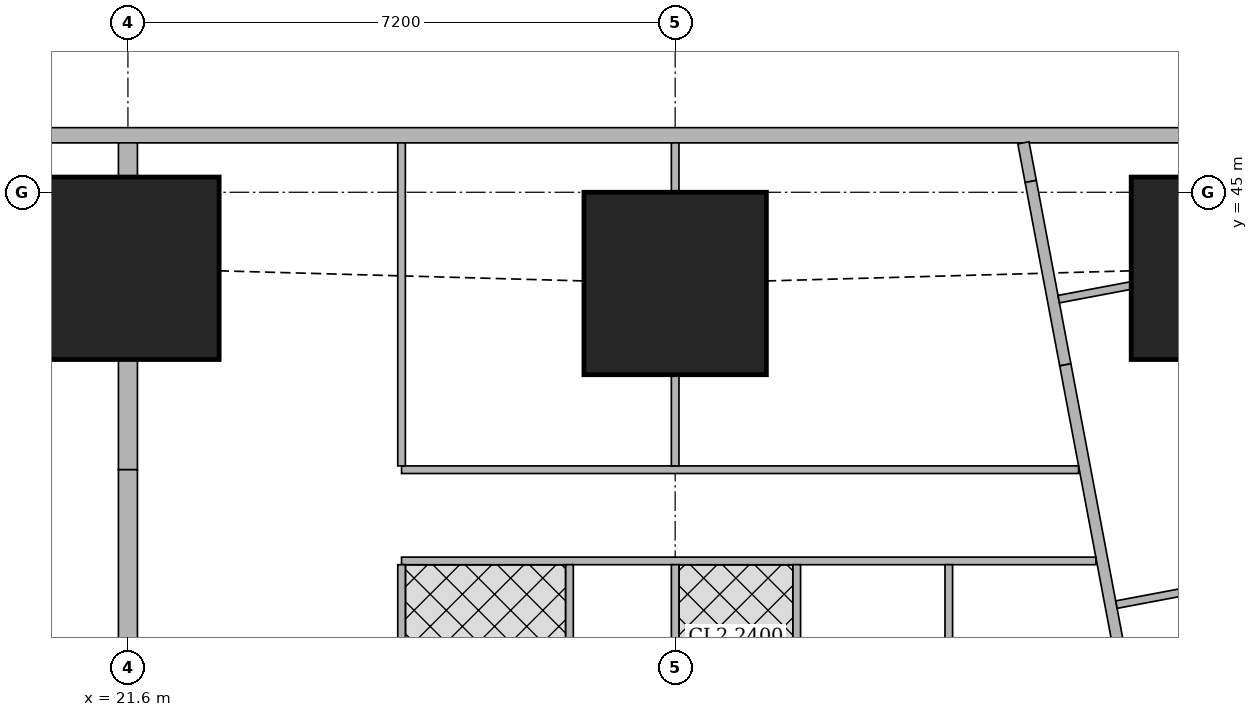
"""IFC4 building model, lengths in metres.
Left out: names, types, materials, properties, quantities, classifications, styles, units other than length and angle.
Written with IfcOpenShell. Run it as: python <this file> out.ifc"""

import sys

from ifc_helpers import new_model, si_unit, direction, frame, frame_2d, origin, origin_2d, place, context, subcontext, project, spatial, rectangle, extrude, element, fill, save


model = new_model("IFC4")
c1 = context("Model", 3, precision=1e-05, world=origin(), true_north=direction((0.0, 1.0)))
c2 = subcontext(c1, "Body", "Model", "MODEL_VIEW")
j1 = project(units=[si_unit("LENGTHUNIT", "METRE"), si_unit("PLANEANGLEUNIT", "RADIAN")], contexts=[c1])
p1 = place(None, origin())
s1 = spatial("IfcSite", under=j1, at=p1, CompositionType="ELEMENT")
p2 = place(p1, origin())
s2 = spatial("IfcBuilding", under=s1, at=p2, CompositionType="ELEMENT")
p3 = place(p2, frame((0.0, 0.0, 234.95)))
s3 = spatial("IfcBuildingStorey", under=s2, at=p3, CompositionType="ELEMENT", Elevation=234.95)
for number, where, z_axis, x_axis in (
    (1, (21.6, 44.0, 0.0), (0.0, 0.0, 1.0), (1.0, 0.0, 0.0)),
    (2, (28.8, 43.8, 0.0), (0.0, 0.0, 1.0), (1.0, 0.0, 0.0)),
    (3, (36.0, 44.0, 0.0), (0.0, 0.0, 1.0), (1.0, 0.0, 0.0)),
):
    element("IfcColumn", number, at=place(p3, frame(where, z_axis=z_axis, x_axis=x_axis)), inside=s3, PredefinedType="COLUMN", context=c2, shape_type="SweptSolid", body=[
        extrude(rectangle(XDim=2.4, YDim=2.4, at=origin_2d()), origin(), (0.0, 0.0, 1.0), 3.75),
    ])
p4 = place(p3, frame((40.106, 45.75, 0.0), z_axis=(0.0, 0.0, 1.0), x_axis=(-1.0, 0.0, 0.0)))
e4 = element("IfcWall", 4, at=p4, inside=s3, PredefinedType="SOLIDWALL", context=c2, shape_type="SweptSolid", body=[
    extrude(rectangle(XDim=25.543, YDim=0.2, at=frame_2d((12.771, 0.0))), origin(), (0.0, 0.0, 1.0), 3.5),
])
p5 = place(p4, frame((8.606, 0.0, 0.9)))
e5 = element("IfcOpeningElement", 5, at=p5, cuts=e4, PredefinedType="OPENING", context=c2, shape_type="SweptSolid", body=[
    extrude(rectangle(XDim=1.8, YDim=1.5, at=frame_2d((0.9, 0.75))), frame((0.0, 0.11, 0.0), z_axis=(0.0, -1.0, 0.0), x_axis=(1.0, 0.0, 0.0)), (0.0, 0.0, 1.0), 0.22),
])
p6 = place(p4, frame((12.206, 0.0, 0.9)))
e6 = element("IfcOpeningElement", 6, at=p6, cuts=e4, PredefinedType="OPENING", context=c2, shape_type="SweptSolid", body=[
    extrude(rectangle(XDim=1.8, YDim=1.5, at=frame_2d((0.9, 0.75))), frame((0.0, 0.11, 0.0), z_axis=(0.0, -1.0, 0.0), x_axis=(1.0, 0.0, 0.0)), (0.0, 0.0, 1.0), 0.22),
])
p7 = place(p4, frame((15.806, 0.0, 0.9)))
e7 = element("IfcOpeningElement", 7, at=p7, cuts=e4, PredefinedType="OPENING", context=c2, shape_type="SweptSolid", body=[
    extrude(rectangle(XDim=1.8, YDim=1.5, at=frame_2d((0.9, 0.75))), frame((0.0, 0.11, 0.0), z_axis=(0.0, -1.0, 0.0), x_axis=(1.0, 0.0, 0.0)), (0.0, 0.0, 1.0), 0.22),
])
p8 = place(p4, frame((20.825, 0.0, 0.9)))
e8 = element("IfcOpeningElement", 8, at=p8, cuts=e4, PredefinedType="OPENING", context=c2, shape_type="SweptSolid", body=[
    extrude(rectangle(XDim=2.4, YDim=1.5, at=frame_2d((1.2, 0.75))), frame((0.0, 0.11, 0.0), z_axis=(0.0, -1.0, 0.0), x_axis=(1.0, 0.0, 0.0)), (0.0, 0.0, 1.0), 0.22),
])
p9 = place(p3, frame((33.382, 45.65, 0.0), z_axis=(0.0, 0.0, 1.0), x_axis=(0.185657456326, -0.982614527122, 0.0)))
e9 = element("IfcWall", 9, at=p9, inside=s3, PredefinedType="SOLIDWALL", context=c2, shape_type="SweptSolid", body=[
    extrude(rectangle(XDim=0.517, YDim=0.15, at=frame_2d((0.258, 0.0))), origin(), (0.0, 0.0, 1.0), 3.5),
])
p10 = place(p3, frame((33.478, 45.142, 0.0), z_axis=(0.0, 0.0, 1.0), x_axis=(0.185393362436, -0.982664388876, 0.0)))
e10 = element("IfcWall", 10, at=p10, inside=s3, PredefinedType="SOLIDWALL", context=c2, shape_type="SweptSolid", body=[
    extrude(rectangle(XDim=2.455, YDim=0.15, at=frame_2d((1.227, 0.0))), origin(), (0.0, 0.0, 1.0), 2.05),
])
p11 = place(p3, frame((33.933, 42.73, 0.0), z_axis=(0.0, 0.0, 1.0), x_axis=(0.185595417643, -0.982626246825, 0.0)))
e11 = element("IfcWall", 11, at=p11, inside=s3, PredefinedType="SOLIDWALL", context=c2, shape_type="SweptSolid", body=[
    extrude(rectangle(XDim=41.051, YDim=0.15, at=frame_2d((20.525, 0.0))), origin(), (0.0, 0.0, 1.0), 2.5),
])
p12 = place(p11, frame((12.266, 0.0, 0.0)))
e12 = element("IfcOpeningElement", 12, at=p12, cuts=e11, PredefinedType="OPENING", context=c2, shape_type="SweptSolid", body=[
    extrude(rectangle(XDim=1.0, YDim=2.1, at=frame_2d((0.5, 1.05))), frame((0.0, 0.085, 0.0), z_axis=(0.0, -1.0, 0.0), x_axis=(1.0, 0.0, 0.0)), (0.0, 0.0, 1.0), 0.17),
])
p13 = place(p11, frame((16.082, 0.0, 0.0)))
e13 = element("IfcOpeningElement", 13, at=p13, cuts=e11, PredefinedType="OPENING", context=c2, shape_type="SweptSolid", body=[
    extrude(rectangle(XDim=1.0, YDim=2.1, at=frame_2d((0.5, 1.05))), frame((0.0, 0.085, 0.0), z_axis=(0.0, -1.0, 0.0), x_axis=(1.0, 0.0, 0.0)), (0.0, 0.0, 1.0), 0.17),
])
p14 = place(p11, frame((30.862, 0.0, 0.0)))
e14 = element("IfcOpeningElement", 14, at=p14, cuts=e11, PredefinedType="OPENING", context=c2, shape_type="SweptSolid", body=[
    extrude(rectangle(XDim=1.0, YDim=2.1, at=frame_2d((0.5, 1.05))), frame((0.0, 0.085, 0.0), z_axis=(0.0, -1.0, 0.0), x_axis=(1.0, 0.0, 0.0)), (0.0, 0.0, 1.0), 0.17),
])
p15 = place(p3, frame((34.79, 43.772, 0.0), z_axis=(0.0, 0.0, 1.0), x_axis=(-0.982655532093, -0.185440301034, 0.0)))
e15 = element("IfcWall", 15, at=p15, inside=s3, PredefinedType="PARTITIONING", context=c2, shape_type="SweptSolid", body=[
    extrude(rectangle(XDim=0.96, YDim=0.1, at=frame_2d((0.48, 0.0))), origin(), (0.0, 0.0, 1.0), 2.05),
])
p16 = place(p3, frame((37.823, 40.182, 0.0), z_axis=(0.0, 0.0, 1.0), x_axis=(-0.982664729897, -0.18539155487, 0.0)))
e16 = element("IfcWall", 16, at=p16, inside=s3, PredefinedType="PARTITIONING", context=c2, shape_type="SweptSolid", body=[
    extrude(rectangle(XDim=3.274, YDim=0.1, at=frame_2d((1.637, 0.0))), origin(), (0.0, 0.0, 1.0), 3.5),
])
p17 = place(p3, frame((25.2, 41.35, 0.0), z_axis=(0.0, 0.0, 1.0), x_axis=(1.0, 0.0, 0.0)))
e17 = element("IfcWall", 17, at=p17, inside=s3, PredefinedType="PARTITIONING", context=c2, shape_type="SweptSolid", body=[
    extrude(rectangle(XDim=8.908, YDim=0.1, at=frame_2d((4.454, 0.0))), origin(), (0.0, 0.0, 1.0), 3.5),
])
p18 = place(p17, frame((0.2, 0.0, 0.0)))
e18 = element("IfcOpeningElement", 18, at=p18, cuts=e17, PredefinedType="OPENING", context=c2, shape_type="SweptSolid", body=[
    extrude(rectangle(XDim=0.9, YDim=2.1, at=frame_2d((0.45, 1.05))), frame((0.0, 0.06, 0.0), z_axis=(0.0, -1.0, 0.0), x_axis=(1.0, 0.0, 0.0)), (0.0, 0.0, 1.0), 0.12),
])
p19 = place(p17, frame((4.85, 0.0, 0.0)))
e19 = element("IfcOpeningElement", 19, at=p19, cuts=e17, PredefinedType="OPENING", context=c2, shape_type="SweptSolid", body=[
    extrude(rectangle(XDim=0.9, YDim=2.1, at=frame_2d((0.45, 1.05))), frame((0.0, 0.06, 0.0), z_axis=(0.0, -1.0, 0.0), x_axis=(1.0, 0.0, 0.0)), (0.0, 0.0, 1.0), 0.12),
])
p20 = place(p3, frame((25.2, 40.15, 0.0), z_axis=(0.0, 0.0, 1.0), x_axis=(1.0, 0.0, 0.0)))
e20 = element("IfcWall", 20, at=p20, inside=s3, PredefinedType="PARTITIONING", context=c2, shape_type="SweptSolid", body=[
    extrude(rectangle(XDim=9.135, YDim=0.1, at=frame_2d((4.567, 0.0))), origin(), (0.0, 0.0, 1.0), 3.5),
])
p21 = place(p20, frame((0.655, 0.0, 0.0)))
e21 = element("IfcOpeningElement", 21, at=p21, cuts=e20, PredefinedType="OPENING", context=c2, shape_type="SweptSolid", body=[
    extrude(rectangle(XDim=0.9, YDim=2.1, at=frame_2d((0.45, 1.05))), frame((0.0, 0.06, 0.0), z_axis=(0.0, -1.0, 0.0), x_axis=(1.0, 0.0, 0.0)), (0.0, 0.0, 1.0), 0.12),
])
p22 = place(p20, frame((3.95, 0.0, 0.0)))
e22 = element("IfcOpeningElement", 22, at=p22, cuts=e20, PredefinedType="OPENING", context=c2, shape_type="SweptSolid", body=[
    extrude(rectangle(XDim=0.9, YDim=2.1, at=frame_2d((0.45, 1.05))), frame((0.0, 0.06, 0.0), z_axis=(0.0, -1.0, 0.0), x_axis=(1.0, 0.0, 0.0)), (0.0, 0.0, 1.0), 0.12),
])
p23 = place(p20, frame((8.081, 0.0, 0.0)))
e23 = element("IfcOpeningElement", 23, at=p23, cuts=e20, PredefinedType="OPENING", context=c2, shape_type="SweptSolid", body=[
    extrude(rectangle(XDim=0.9, YDim=2.1, at=frame_2d((0.45, 1.05))), frame((0.0, 0.06, 0.0), z_axis=(0.0, -1.0, 0.0), x_axis=(1.0, 0.0, 0.0)), (0.0, 0.0, 1.0), 0.12),
])
p24 = place(p20, frame((2.455, 0.0, 0.0)))
e24 = element("IfcOpeningElement", 24, at=p24, cuts=e20, PredefinedType="OPENING", context=c2, shape_type="SweptSolid", body=[
    extrude(rectangle(XDim=0.9, YDim=2.1, at=frame_2d((0.45, 1.05))), frame((0.0, 0.06, 0.0), z_axis=(0.0, -1.0, 0.0), x_axis=(1.0, 0.0, 0.0)), (0.0, 0.0, 1.0), 0.12),
])
p25 = place(p20, frame((5.75, 0.0, 0.0)))
e25 = element("IfcOpeningElement", 25, at=p25, cuts=e20, PredefinedType="OPENING", context=c2, shape_type="SweptSolid", body=[
    extrude(rectangle(XDim=0.9, YDim=2.1, at=frame_2d((0.45, 1.05))), frame((0.0, 0.06, 0.0), z_axis=(0.0, -1.0, 0.0), x_axis=(1.0, 0.0, 0.0)), (0.0, 0.0, 1.0), 0.12),
])
p26 = place(p3, frame((25.2, 41.4, 0.0), z_axis=(0.0, 0.0, 1.0), x_axis=(0.0, 1.0, 0.0)))
e26 = element("IfcWall", 26, at=p26, inside=s3, PredefinedType="PARTITIONING", context=c2, shape_type="SweptSolid", body=[
    extrude(rectangle(XDim=4.25, YDim=0.1, at=frame_2d((2.125, 0.0))), origin(), (0.0, 0.0, 1.0), 2.05),
])
p27 = place(p3, frame((28.8, 41.4, 0.0), z_axis=(0.0, 0.0, 1.0), x_axis=(0.0, 1.0, 0.0)))
e27 = element("IfcWall", 27, at=p27, inside=s3, PredefinedType="PARTITIONING", context=c2, shape_type="SweptSolid", body=[
    extrude(rectangle(XDim=1.199, YDim=0.1, at=frame_2d((0.6, 0.0))), origin(), (0.0, 0.0, 1.0), 3.5),
])
p28 = place(p3, frame((28.8, 45.001, 0.0), z_axis=(0.0, 0.0, 1.0), x_axis=(0.0, 1.0, 0.0)))
e28 = element("IfcWall", 28, at=p28, inside=s3, PredefinedType="PARTITIONING", context=c2, shape_type="SweptSolid", body=[
    extrude(rectangle(XDim=0.649, YDim=0.1, at=frame_2d((0.324, 0.0))), origin(), (0.0, 0.0, 1.0), 3.5),
])
p29 = place(p3, frame((25.2, 36.825, 0.0), z_axis=(0.0, 0.0, 1.0), x_axis=(0.0, 1.0, 0.0)))
e29 = element("IfcWall", 29, at=p29, inside=s3, PredefinedType="PARTITIONING", context=c2, shape_type="SweptSolid", body=[
    extrude(rectangle(XDim=3.275, YDim=0.1, at=frame_2d((1.638, 0.0))), origin(), (0.0, 0.0, 1.0), 3.5),
])
p30 = place(p3, frame((28.8, 38.201, 0.0), z_axis=(0.0, 0.0, 1.0), x_axis=(0.0, 1.0, 0.0)))
e30 = element("IfcWall", 30, at=p30, inside=s3, PredefinedType="PARTITIONING", context=c2, shape_type="SweptSolid", body=[
    extrude(rectangle(XDim=1.899, YDim=0.1, at=frame_2d((0.95, 0.0))), origin(), (0.0, 0.0, 1.0), 3.5),
])
for number, where, z_axis, x_axis in (
    (31, (32.4, 36.825, 0.0), (0.0, 0.0, 1.0), (0.0, 1.0, 0.0)),
    (32, (27.41, 36.825, 0.0), (0.0, 0.0, 1.0), (0.0, 1.0, 0.0)),
    (33, (30.4, 36.825, 0.0), (0.0, 0.0, 1.0), (0.0, 1.0, 0.0)),
):
    element("IfcWall", number, at=place(p3, frame(where, z_axis=z_axis, x_axis=x_axis)), inside=s3, PredefinedType="PARTITIONING", context=c2, shape_type="SweptSolid", body=[
        extrude(rectangle(XDim=3.275, YDim=0.1, at=frame_2d((1.638, 0.0))), origin(), (0.0, 0.0, 1.0), 3.5),
    ])
p31 = place(p3, frame((21.6, 41.35, 0.0), z_axis=(0.0, 0.0, 1.0), x_axis=(0.0, 1.0, 0.0)))
e34 = element("IfcWall", 34, at=p31, inside=s3, PredefinedType="SOLIDWALL", context=c2, shape_type="SweptSolid", body=[
    extrude(rectangle(XDim=1.449, YDim=0.25, at=frame_2d((0.725, 0.0))), origin(), (0.0, 0.0, 1.0), 2.05),
])
p32 = place(p3, frame((21.6, 45.201, 0.0), z_axis=(0.0, 0.0, 1.0), x_axis=(0.0, 1.0, 0.0)))
e35 = element("IfcWall", 35, at=p32, inside=s3, PredefinedType="SOLIDWALL", context=c2, shape_type="SweptSolid", body=[
    extrude(rectangle(XDim=0.449, YDim=0.25, at=frame_2d((0.225, 0.0))), origin(), (0.0, 0.0, 1.0), 2.05),
])
p33 = place(p3, frame((21.6, 38.201, 0.0), z_axis=(0.0, 0.0, 1.0), x_axis=(0.0, 1.0, 0.0)))
e36 = element("IfcWall", 36, at=p33, inside=s3, PredefinedType="SOLIDWALL", context=c2, shape_type="SweptSolid", body=[
    extrude(rectangle(XDim=3.149, YDim=0.25, at=frame_2d((1.575, 0.0))), origin(), (0.0, 0.0, 1.0), 3.5),
])
p34 = place(p5, origin())
e37 = element("IfcWindow", 37, at=p34, inside=s3, PartitioningType="SINGLE_PANEL", PredefinedType="WINDOW", context=c2, shape_type="SweptSolid", body=[
    extrude(rectangle(XDim=1.8, YDim=1.5, at=frame_2d((0.9, 0.75))), frame((0.0, 0.03, 0.0), z_axis=(0.0, -1.0, 0.0), x_axis=(1.0, 0.0, 0.0)), (0.0, 0.0, 1.0), 0.06),
])
fill(e5, e37)
p35 = place(p6, origin())
e38 = element("IfcWindow", 38, at=p35, inside=s3, PartitioningType="SINGLE_PANEL", PredefinedType="WINDOW", context=c2, shape_type="SweptSolid", body=[
    extrude(rectangle(XDim=1.8, YDim=1.5, at=frame_2d((0.9, 0.75))), frame((0.0, 0.03, 0.0), z_axis=(0.0, -1.0, 0.0), x_axis=(1.0, 0.0, 0.0)), (0.0, 0.0, 1.0), 0.06),
])
fill(e6, e38)
p36 = place(p7, origin())
e39 = element("IfcWindow", 39, at=p36, inside=s3, PartitioningType="SINGLE_PANEL", PredefinedType="WINDOW", context=c2, shape_type="SweptSolid", body=[
    extrude(rectangle(XDim=1.8, YDim=1.5, at=frame_2d((0.9, 0.75))), frame((0.0, 0.03, 0.0), z_axis=(0.0, -1.0, 0.0), x_axis=(1.0, 0.0, 0.0)), (0.0, 0.0, 1.0), 0.06),
])
fill(e7, e39)
p37 = place(p18, origin())
e40 = element("IfcDoor", 40, at=p37, inside=s3, OperationType="SINGLE_SWING_LEFT", PredefinedType="DOOR", context=c2, shape_type="SweptSolid", body=[
    extrude(rectangle(XDim=0.9, YDim=2.1, at=frame_2d((0.45, 1.05))), frame((0.0, 0.025, 0.0), z_axis=(0.0, -1.0, 0.0), x_axis=(1.0, 0.0, 0.0)), (0.0, 0.0, 1.0), 0.05),
])
fill(e18, e40)
p38 = place(p19, origin())
e41 = element("IfcDoor", 41, at=p38, inside=s3, OperationType="SINGLE_SWING_LEFT", PredefinedType="DOOR", context=c2, shape_type="SweptSolid", body=[
    extrude(rectangle(XDim=0.9, YDim=2.1, at=frame_2d((0.45, 1.05))), frame((0.0, 0.025, 0.0), z_axis=(0.0, -1.0, 0.0), x_axis=(1.0, 0.0, 0.0)), (0.0, 0.0, 1.0), 0.05),
])
fill(e19, e41)
p39 = place(p21, origin())
e42 = element("IfcDoor", 42, at=p39, inside=s3, OperationType="SINGLE_SWING_RIGHT", PredefinedType="DOOR", context=c2, shape_type="SweptSolid", body=[
    extrude(rectangle(XDim=0.9, YDim=2.1, at=frame_2d((0.45, 1.05))), frame((0.0, 0.025, 0.0), z_axis=(0.0, -1.0, 0.0), x_axis=(1.0, 0.0, 0.0)), (0.0, 0.0, 1.0), 0.05),
])
fill(e21, e42)
p40 = place(p22, origin())
e43 = element("IfcDoor", 43, at=p40, inside=s3, OperationType="SINGLE_SWING_RIGHT", PredefinedType="DOOR", context=c2, shape_type="SweptSolid", body=[
    extrude(rectangle(XDim=0.9, YDim=2.1, at=frame_2d((0.45, 1.05))), frame((0.0, 0.025, 0.0), z_axis=(0.0, -1.0, 0.0), x_axis=(1.0, 0.0, 0.0)), (0.0, 0.0, 1.0), 0.05),
])
fill(e22, e43)
p41 = place(p23, origin())
e44 = element("IfcDoor", 44, at=p41, inside=s3, OperationType="SINGLE_SWING_LEFT", PredefinedType="DOOR", context=c2, shape_type="SweptSolid", body=[
    extrude(rectangle(XDim=0.9, YDim=2.1, at=frame_2d((0.45, 1.05))), frame((0.0, 0.025, 0.0), z_axis=(0.0, -1.0, 0.0), x_axis=(1.0, 0.0, 0.0)), (0.0, 0.0, 1.0), 0.05),
])
fill(e23, e44)
p42 = place(p24, origin())
e45 = element("IfcDoor", 45, at=p42, inside=s3, OperationType="SINGLE_SWING_LEFT", PredefinedType="DOOR", context=c2, shape_type="SweptSolid", body=[
    extrude(rectangle(XDim=0.9, YDim=2.1, at=frame_2d((0.45, 1.05))), frame((0.0, 0.025, 0.0), z_axis=(0.0, -1.0, 0.0), x_axis=(1.0, 0.0, 0.0)), (0.0, 0.0, 1.0), 0.05),
])
fill(e24, e45)
p43 = place(p25, origin())
e46 = element("IfcDoor", 46, at=p43, inside=s3, OperationType="SINGLE_SWING_LEFT", PredefinedType="DOOR", context=c2, shape_type="SweptSolid", body=[
    extrude(rectangle(XDim=0.9, YDim=2.1, at=frame_2d((0.45, 1.05))), frame((0.0, 0.025, 0.0), z_axis=(0.0, -1.0, 0.0), x_axis=(1.0, 0.0, 0.0)), (0.0, 0.0, 1.0), 0.05),
])
fill(e25, e46)
save(model, sys.argv[1])
